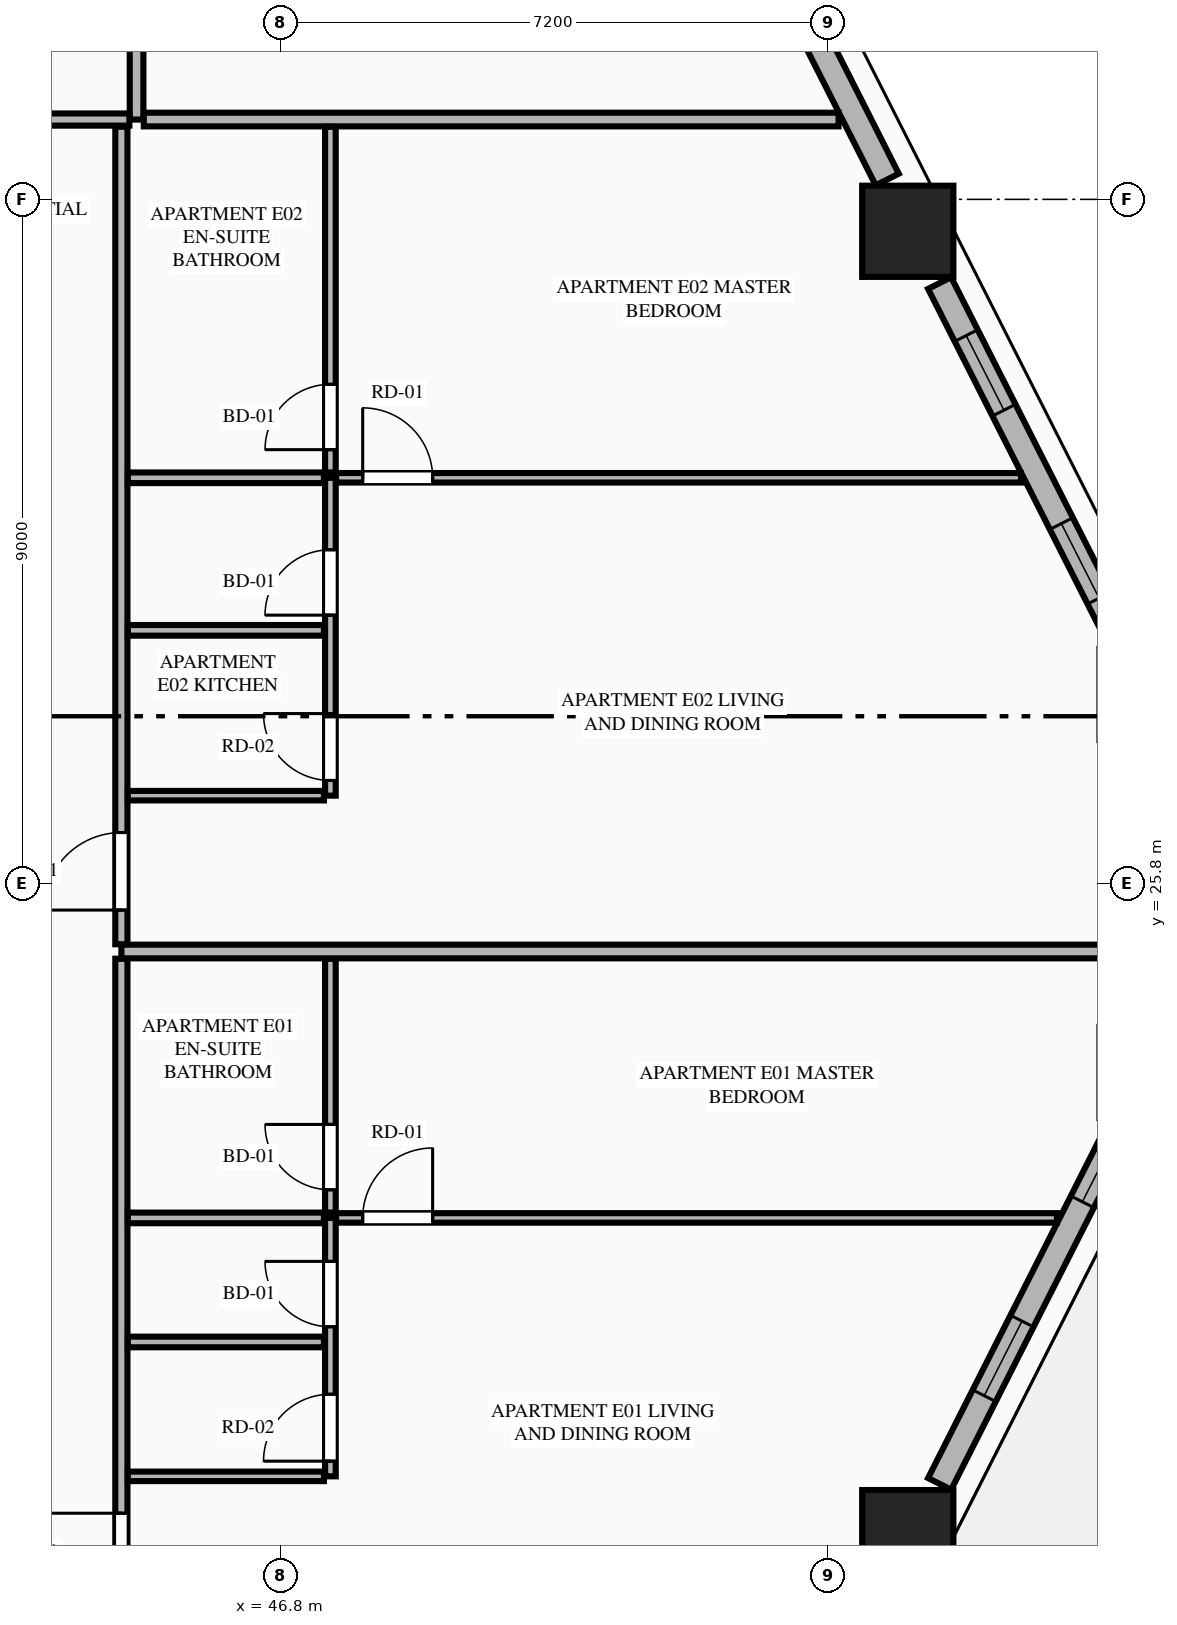
"""IFC4 building model, lengths in metres.
Left out: names, types, materials, properties, quantities, classifications, styles, units other than length and angle.
Written with IfcOpenShell. Run it as: python <this file> out.ifc"""

import sys

from ifc_helpers import new_model, si_unit, direction, frame, frame_2d, origin, origin_2d, place, context, subcontext, project, spatial, rectangle, extrude, element, fill, save


model = new_model("IFC4")
c1 = context("Model", 3, precision=1e-05, world=origin(), true_north=direction((0.0, 1.0)))
c2 = subcontext(c1, "Body", "Model", "MODEL_VIEW")
j1 = project(units=[si_unit("LENGTHUNIT", "METRE"), si_unit("PLANEANGLEUNIT", "RADIAN")], contexts=[c1])
p1 = place(None, origin())
s1 = spatial("IfcSite", under=j1, at=p1, CompositionType="ELEMENT")
p2 = place(p1, origin())
s2 = spatial("IfcBuilding", under=s1, at=p2, CompositionType="ELEMENT")
p3 = place(p2, frame((0.0, 0.0, 71.05)))
s3 = spatial("IfcBuildingStorey", under=s2, at=p3, CompositionType="ELEMENT", Elevation=71.05)
for number, where, z_axis, x_axis in (
    (1, (55.046, 17.22, 0.0), (0.0, 0.0, 1.0), (1.0, 0.0, 0.0)),
    (2, (55.046, 34.38, 0.0), (0.0, 0.0, 1.0), (1.0, 0.0, 0.0)),
):
    element("IfcColumn", number, at=place(p3, frame(where, z_axis=z_axis, x_axis=x_axis)), inside=s3, PredefinedType="COLUMN", context=c2, shape_type="SweptSolid", body=[
        extrude(rectangle(XDim=1.2, YDim=1.2, at=origin_2d()), origin(), (0.0, 0.0, 1.0), 3.55),
    ])
p4 = place(p3, frame((55.465, 17.901, 0.0), z_axis=(0.0, 0.0, 1.0), x_axis=(0.451572088722, 0.892234637686, 0.0)))
e3 = element("IfcWall", 3, at=p4, inside=s3, PredefinedType="STANDARD", context=c2, shape_type="SweptSolid", body=[
    extrude(rectangle(XDim=5.304, YDim=0.34, at=frame_2d((2.652, 0.0))), origin(), (0.0, 0.0, 1.0), 2.652),
])
p5 = place(p4, frame((1.3, 0.0, 0.75)))
e4 = element("IfcOpeningElement", 4, at=p5, cuts=e3, PredefinedType="OPENING", context=c2, shape_type="SweptSolid", body=[
    extrude(rectangle(XDim=1.1, YDim=1.752, at=frame_2d((0.55, 0.876))), frame((0.0, 0.18, 0.0), z_axis=(0.0, -1.0, 0.0), x_axis=(1.0, 0.0, 0.0)), (0.0, 0.0, 1.0), 0.36),
])
p6 = place(p4, frame((4.159, 0.0, 0.75)))
e5 = element("IfcOpeningElement", 5, at=p6, cuts=e3, PredefinedType="OPENING", context=c2, shape_type="SweptSolid", body=[
    extrude(rectangle(XDim=0.924, YDim=1.752, at=frame_2d((0.462, 0.876))), frame((0.0, 0.18, 0.0), z_axis=(0.0, -1.0, 0.0), x_axis=(1.0, 0.0, 0.0)), (0.0, 0.0, 1.0), 0.36),
])
p7 = place(p3, frame((57.86, 28.967, 0.0), z_axis=(0.0, 0.0, 1.0), x_axis=(-0.451590635984, 0.892225250422, 0.0)))
e6 = element("IfcWall", 6, at=p7, inside=s3, PredefinedType="STANDARD", context=c2, shape_type="SweptSolid", body=[
    extrude(rectangle(XDim=5.303, YDim=0.34, at=frame_2d((2.652, 0.0))), origin(), (0.0, 0.0, 1.0), 2.652),
])
p8 = place(p7, frame((0.657, 0.0, 0.75)))
e7 = element("IfcOpeningElement", 7, at=p8, cuts=e6, PredefinedType="OPENING", context=c2, shape_type="SweptSolid", body=[
    extrude(rectangle(XDim=1.1, YDim=1.752, at=frame_2d((0.55, 0.876))), frame((0.0, 0.18, 0.0), z_axis=(0.0, -1.0, 0.0), x_axis=(1.0, 0.0, 0.0)), (0.0, 0.0, 1.0), 0.36),
])
p9 = place(p7, frame((3.429, 0.0, 0.75)))
e8 = element("IfcOpeningElement", 8, at=p9, cuts=e6, PredefinedType="OPENING", context=c2, shape_type="SweptSolid", body=[
    extrude(rectangle(XDim=1.1, YDim=1.752, at=frame_2d((0.55, 0.876))), frame((0.0, 0.18, 0.0), z_axis=(0.0, -1.0, 0.0), x_axis=(1.0, 0.0, 0.0)), (0.0, 0.0, 1.0), 0.36),
])
p10 = place(p3, frame((54.776, 35.061, 0.0), z_axis=(0.0, 0.0, 1.0), x_axis=(-0.451592100298, 0.892224509273, 0.0)))
e9 = element("IfcWall", 9, at=p10, inside=s3, PredefinedType="STANDARD", context=c2, shape_type="SweptSolid", body=[
    extrude(rectangle(XDim=5.547, YDim=0.34, at=frame_2d((2.773, 0.0))), origin(), (0.0, 0.0, 1.0), 2.652),
])
p11 = place(p10, frame((2.223, 0.0, 0.75)))
e10 = element("IfcOpeningElement", 10, at=p11, cuts=e9, PredefinedType="OPENING", context=c2, shape_type="SweptSolid", body=[
    extrude(rectangle(XDim=1.1, YDim=1.752, at=frame_2d((0.55, 0.876))), frame((0.0, 0.18, 0.0), z_axis=(0.0, -1.0, 0.0), x_axis=(1.0, 0.0, 0.0)), (0.0, 0.0, 1.0), 0.36),
])
p12 = place(p3, frame((44.9, 35.85, 0.0), z_axis=(0.0, 0.0, 1.0), x_axis=(0.0, 1.0, 0.0)))
e11 = element("IfcWall", 11, at=p12, inside=s3, PredefinedType="PARTITIONING", context=c2, shape_type="SweptSolid", body=[
    extrude(rectangle(XDim=13.295, YDim=0.18, at=frame_2d((6.647, 0.0))), origin(), (0.0, 0.0, 1.0), 3.27),
])
p13 = place(p3, frame((36.617, 35.85, 0.0), z_axis=(0.0, 0.0, 1.0), x_axis=(1.0, 0.0, 0.0)))
e12 = element("IfcWall", 12, at=p13, inside=s3, PredefinedType="PARTITIONING", context=c2, shape_type="SweptSolid", body=[
    extrude(rectangle(XDim=8.188, YDim=0.16, at=frame_2d((4.094, 0.0))), origin(), (0.0, 0.0, 1.0), 3.27),
])
p14 = place(p13, frame((0.355, 0.0, 0.0)))
e13 = element("IfcOpeningElement", 13, at=p14, cuts=e12, PredefinedType="OPENING", context=c2, shape_type="SweptSolid", body=[
    extrude(rectangle(XDim=1.02, YDim=2.25, at=frame_2d((0.51, 1.125))), frame((0.0, 0.09, 0.0), z_axis=(0.0, -1.0, 0.0), x_axis=(1.0, 0.0, 0.0)), (0.0, 0.0, 1.0), 0.18),
])
p15 = place(p3, frame((44.995, 35.85, 0.0), z_axis=(0.0, 0.0, 1.0), x_axis=(1.0, 0.0, 0.0)))
e14 = element("IfcWall", 14, at=p15, inside=s3, PredefinedType="PARTITIONING", context=c2, shape_type="SweptSolid", body=[
    extrude(rectangle(XDim=9.14, YDim=0.18, at=frame_2d((4.57, 0.0))), origin(), (0.0, 0.0, 1.0), 3.27),
])
p16 = place(p3, frame((44.7, 16.045, 0.0), z_axis=(0.0, 0.0, 1.0), x_axis=(0.0, 1.0, 0.0)))
e15 = element("IfcWall", 15, at=p16, inside=s3, PredefinedType="PARTITIONING", context=c2, shape_type="SweptSolid", body=[
    extrude(rectangle(XDim=8.765, YDim=0.16, at=frame_2d((4.383, 0.0))), origin(), (0.0, 0.0, 1.0), 2.64),
])
p17 = place(p16, frame((0.45, 0.0, 0.0)))
e16 = element("IfcOpeningElement", 16, at=p17, cuts=e15, PredefinedType="OPENING", context=c2, shape_type="SweptSolid", body=[
    extrude(rectangle(XDim=1.02, YDim=2.25, at=frame_2d((0.51, 1.125))), frame((0.0, 0.09, 0.0), z_axis=(0.0, -1.0, 0.0), x_axis=(1.0, 0.0, 0.0)), (0.0, 0.0, 1.0), 0.18),
])
p18 = place(p3, frame((44.785, 18.0, 0.0), z_axis=(0.0, 0.0, 1.0), x_axis=(1.0, 0.0, 0.0)))
e17 = element("IfcWall", 17, at=p18, inside=s3, PredefinedType="PARTITIONING", context=c2, shape_type="SweptSolid", body=[
    extrude(rectangle(XDim=2.58, YDim=0.125, at=frame_2d((1.29, 0.0))), origin(), (0.0, 0.0, 1.0), 2.64),
])
p19 = place(p3, frame((47.45, 18.0, 0.0), z_axis=(0.0, 0.0, 1.0), x_axis=(0.0, 1.0, 0.0)))
e18 = element("IfcWall", 18, at=p19, inside=s3, PredefinedType="PLUMBINGWALL", context=c2, shape_type="SweptSolid", body=[
    extrude(rectangle(XDim=3.4, YDim=0.14, at=frame_2d((1.7, 0.0))), origin(), (0.0, 0.0, 1.0), 3.27),
])
p20 = place(p19, frame((0.2, 0.0, 0.0)))
e19 = element("IfcOpeningElement", 19, at=p20, cuts=e18, PredefinedType="OPENING", context=c2, shape_type="SweptSolid", body=[
    extrude(rectangle(XDim=0.88, YDim=2.15, at=frame_2d((0.44, 1.075))), frame((0.0, 0.08, 0.0), z_axis=(0.0, -1.0, 0.0), x_axis=(1.0, 0.0, 0.0)), (0.0, 0.0, 1.0), 0.16),
])
p21 = place(p19, frame((1.968, 0.0, 0.0)))
e20 = element("IfcOpeningElement", 20, at=p21, cuts=e18, PredefinedType="OPENING", context=c2, shape_type="SweptSolid", body=[
    extrude(rectangle(XDim=0.86, YDim=2.1, at=frame_2d((0.43, 1.05))), frame((0.0, 0.08, 0.0), z_axis=(0.0, -1.0, 0.0), x_axis=(1.0, 0.0, 0.0)), (0.0, 0.0, 1.0), 0.16),
])
p22 = place(p3, frame((47.45, 21.47, 0.0), z_axis=(0.0, 0.0, 1.0), x_axis=(0.0, 1.0, 0.0)))
e21 = element("IfcWall", 21, at=p22, inside=s3, PredefinedType="PLUMBINGWALL", context=c2, shape_type="SweptSolid", body=[
    extrude(rectangle(XDim=3.34, YDim=0.14, at=frame_2d((1.67, 0.0))), origin(), (0.0, 0.0, 1.0), 3.27),
])
p23 = place(p22, frame((0.3, 0.0, 0.0)))
e22 = element("IfcOpeningElement", 22, at=p23, cuts=e21, PredefinedType="OPENING", context=c2, shape_type="SweptSolid", body=[
    extrude(rectangle(XDim=0.86, YDim=2.1, at=frame_2d((0.43, 1.05))), frame((0.0, 0.08, 0.0), z_axis=(0.0, -1.0, 0.0), x_axis=(1.0, 0.0, 0.0)), (0.0, 0.0, 1.0), 0.16),
])
p24 = place(p3, frame((44.785, 21.4, 0.0), z_axis=(0.0, 0.0, 1.0), x_axis=(1.0, 0.0, 0.0)))
e23 = element("IfcWall", 23, at=p24, inside=s3, PredefinedType="PLUMBINGWALL", context=c2, shape_type="SweptSolid", body=[
    extrude(rectangle(XDim=2.58, YDim=0.14, at=frame_2d((1.29, 0.0))), origin(), (0.0, 0.0, 1.0), 3.27),
])
p25 = place(p3, frame((47.525, 21.4, 0.0), z_axis=(0.0, 0.0, 1.0), x_axis=(1.0, 0.0, 0.0)))
e24 = element("IfcWall", 24, at=p25, inside=s3, PredefinedType="PARTITIONING", context=c2, shape_type="SweptSolid", body=[
    extrude(rectangle(XDim=9.484, YDim=0.125, at=frame_2d((4.742, 0.0))), origin(), (0.0, 0.0, 1.0), 3.27),
])
p26 = place(p25, frame((0.35, 0.0, 0.0)))
e25 = element("IfcOpeningElement", 25, at=p26, cuts=e24, PredefinedType="OPENING", context=c2, shape_type="SweptSolid", body=[
    extrude(rectangle(XDim=0.92, YDim=2.15, at=frame_2d((0.46, 1.075))), frame((0.0, 0.073, 0.0), z_axis=(0.0, -1.0, 0.0), x_axis=(1.0, 0.0, 0.0)), (0.0, 0.0, 1.0), 0.145),
])
p27 = place(p3, frame((44.785, 19.768, 0.0), z_axis=(0.0, 0.0, 1.0), x_axis=(1.0, 0.0, 0.0)))
e26 = element("IfcWall", 26, at=p27, inside=s3, PredefinedType="PLUMBINGWALL", context=c2, shape_type="SweptSolid", body=[
    extrude(rectangle(XDim=2.58, YDim=0.14, at=frame_2d((1.29, 0.0))), origin(), (0.0, 0.0, 1.0), 3.27),
])
p28 = place(p3, frame((44.7, 24.905, 0.0), z_axis=(0.0, 0.0, 1.0), x_axis=(1.0, 0.0, 0.0)))
e27 = element("IfcWall", 27, at=p28, inside=s3, PredefinedType="PARTITIONING", context=c2, shape_type="SweptSolid", body=[
    extrude(rectangle(XDim=14.013, YDim=0.18, at=frame_2d((7.006, 0.0))), origin(), (0.0, 0.0, 1.0), 3.27),
])
p29 = place(p3, frame((44.7, 25.0, 0.0), z_axis=(0.0, 0.0, 1.0), x_axis=(0.0, 1.0, 0.0)))
e28 = element("IfcWall", 28, at=p29, inside=s3, PredefinedType="PARTITIONING", context=c2, shape_type="SweptSolid", body=[
    extrude(rectangle(XDim=10.755, YDim=0.16, at=frame_2d((5.377, 0.0))), origin(), (0.0, 0.0, 1.0), 2.64),
])
p30 = place(p29, frame((0.45, 0.0, 0.0)))
e29 = element("IfcOpeningElement", 29, at=p30, cuts=e28, PredefinedType="OPENING", context=c2, shape_type="SweptSolid", body=[
    extrude(rectangle(XDim=1.02, YDim=2.25, at=frame_2d((0.51, 1.125))), frame((0.0, 0.09, 0.0), z_axis=(0.0, -1.0, 0.0), x_axis=(1.0, 0.0, 0.0)), (0.0, 0.0, 1.0), 0.18),
])
p31 = place(p3, frame((44.785, 26.955, 0.0), z_axis=(0.0, 0.0, 1.0), x_axis=(1.0, 0.0, 0.0)))
e30 = element("IfcWall", 30, at=p31, inside=s3, PredefinedType="PARTITIONING", context=c2, shape_type="SweptSolid", body=[
    extrude(rectangle(XDim=2.58, YDim=0.125, at=frame_2d((1.29, 0.0))), origin(), (0.0, 0.0, 1.0), 3.27),
])
p32 = place(p3, frame((47.45, 26.955, 0.0), z_axis=(0.0, 0.0, 1.0), x_axis=(0.0, 1.0, 0.0)))
e31 = element("IfcWall", 31, at=p32, inside=s3, PredefinedType="PLUMBINGWALL", context=c2, shape_type="SweptSolid", body=[
    extrude(rectangle(XDim=4.182, YDim=0.14, at=frame_2d((2.091, 0.0))), origin(), (0.0, 0.0, 1.0), 3.27),
])
p33 = place(p32, frame((0.2, 0.0, 0.0)))
e32 = element("IfcOpeningElement", 32, at=p33, cuts=e31, PredefinedType="OPENING", context=c2, shape_type="SweptSolid", body=[
    extrude(rectangle(XDim=0.88, YDim=2.15, at=frame_2d((0.44, 1.075))), frame((0.0, 0.08, 0.0), z_axis=(0.0, -1.0, 0.0), x_axis=(1.0, 0.0, 0.0)), (0.0, 0.0, 1.0), 0.16),
])
p34 = place(p32, frame((2.375, 0.0, 0.0)))
e33 = element("IfcOpeningElement", 33, at=p34, cuts=e31, PredefinedType="OPENING", context=c2, shape_type="SweptSolid", body=[
    extrude(rectangle(XDim=0.86, YDim=2.1, at=frame_2d((0.43, 1.05))), frame((0.0, 0.08, 0.0), z_axis=(0.0, -1.0, 0.0), x_axis=(1.0, 0.0, 0.0)), (0.0, 0.0, 1.0), 0.16),
])
p35 = place(p3, frame((47.45, 31.207, 0.0), z_axis=(0.0, 0.0, 1.0), x_axis=(0.0, 1.0, 0.0)))
e34 = element("IfcWall", 34, at=p35, inside=s3, PredefinedType="PLUMBINGWALL", context=c2, shape_type="SweptSolid", body=[
    extrude(rectangle(XDim=4.548, YDim=0.14, at=frame_2d((2.274, 0.0))), origin(), (0.0, 0.0, 1.0), 3.27),
])
p36 = place(p35, frame((0.3, 0.0, 0.0)))
e35 = element("IfcOpeningElement", 35, at=p36, cuts=e34, PredefinedType="OPENING", context=c2, shape_type="SweptSolid", body=[
    extrude(rectangle(XDim=0.86, YDim=2.1, at=frame_2d((0.43, 1.05))), frame((0.0, 0.08, 0.0), z_axis=(0.0, -1.0, 0.0), x_axis=(1.0, 0.0, 0.0)), (0.0, 0.0, 1.0), 0.16),
])
p37 = place(p3, frame((44.785, 31.137, 0.0), z_axis=(0.0, 0.0, 1.0), x_axis=(1.0, 0.0, 0.0)))
e36 = element("IfcWall", 36, at=p37, inside=s3, PredefinedType="PLUMBINGWALL", context=c2, shape_type="SweptSolid", body=[
    extrude(rectangle(XDim=2.58, YDim=0.14, at=frame_2d((1.29, 0.0))), origin(), (0.0, 0.0, 1.0), 3.27),
])
p38 = place(p3, frame((47.525, 31.137, 0.0), z_axis=(0.0, 0.0, 1.0), x_axis=(1.0, 0.0, 0.0)))
e37 = element("IfcWall", 37, at=p38, inside=s3, PredefinedType="PARTITIONING", context=c2, shape_type="SweptSolid", body=[
    extrude(rectangle(XDim=9.01, YDim=0.125, at=frame_2d((4.505, 0.0))), origin(), (0.0, 0.0, 1.0), 3.27),
])
p39 = place(p38, frame((0.35, 0.0, 0.0)))
e38 = element("IfcOpeningElement", 38, at=p39, cuts=e37, PredefinedType="OPENING", context=c2, shape_type="SweptSolid", body=[
    extrude(rectangle(XDim=0.92, YDim=2.15, at=frame_2d((0.46, 1.075))), frame((0.0, 0.073, 0.0), z_axis=(0.0, -1.0, 0.0), x_axis=(1.0, 0.0, 0.0)), (0.0, 0.0, 1.0), 0.145),
])
p40 = place(p3, frame((44.785, 29.13, 0.0), z_axis=(0.0, 0.0, 1.0), x_axis=(1.0, 0.0, 0.0)))
e39 = element("IfcWall", 39, at=p40, inside=s3, PredefinedType="PLUMBINGWALL", context=c2, shape_type="SweptSolid", body=[
    extrude(rectangle(XDim=2.58, YDim=0.14, at=frame_2d((1.29, 0.0))), origin(), (0.0, 0.0, 1.0), 3.27),
])
p41 = place(p5, origin())
e40 = element("IfcWindow", 40, at=p41, inside=s3, PartitioningType="SINGLE_PANEL", PredefinedType="WINDOW", context=c2, shape_type="SweptSolid", body=[
    extrude(rectangle(XDim=1.1, YDim=1.752, at=frame_2d((0.55, 0.876))), frame((0.0, 0.03, 0.0), z_axis=(0.0, -1.0, 0.0), x_axis=(1.0, 0.0, 0.0)), (0.0, 0.0, 1.0), 0.06),
])
fill(e4, e40)
p42 = place(p8, origin())
e41 = element("IfcWindow", 41, at=p42, inside=s3, PartitioningType="SINGLE_PANEL", PredefinedType="WINDOW", context=c2, shape_type="SweptSolid", body=[
    extrude(rectangle(XDim=1.1, YDim=1.752, at=frame_2d((0.55, 0.876))), frame((0.0, 0.03, 0.0), z_axis=(0.0, -1.0, 0.0), x_axis=(1.0, 0.0, 0.0)), (0.0, 0.0, 1.0), 0.06),
])
fill(e7, e41)
p43 = place(p20, origin())
e42 = element("IfcDoor", 42, at=p43, inside=s3, OperationType="SINGLE_SWING_LEFT", PredefinedType="DOOR", context=c2, shape_type="SweptSolid", body=[
    extrude(rectangle(XDim=0.88, YDim=2.15, at=frame_2d((0.44, 1.075))), frame((0.0, 0.025, 0.0), z_axis=(0.0, -1.0, 0.0), x_axis=(1.0, 0.0, 0.0)), (0.0, 0.0, 1.0), 0.05),
])
fill(e19, e42)
p44 = place(p21, origin())
e43 = element("IfcDoor", 43, at=p44, inside=s3, OperationType="SINGLE_SWING_RIGHT", PredefinedType="DOOR", context=c2, shape_type="SweptSolid", body=[
    extrude(rectangle(XDim=0.86, YDim=2.1, at=frame_2d((0.43, 1.05))), frame((0.0, 0.025, 0.0), z_axis=(0.0, -1.0, 0.0), x_axis=(1.0, 0.0, 0.0)), (0.0, 0.0, 1.0), 0.05),
])
fill(e20, e43)
p45 = place(p23, origin())
e44 = element("IfcDoor", 44, at=p45, inside=s3, OperationType="SINGLE_SWING_RIGHT", PredefinedType="DOOR", context=c2, shape_type="SweptSolid", body=[
    extrude(rectangle(XDim=0.86, YDim=2.1, at=frame_2d((0.43, 1.05))), frame((0.0, 0.025, 0.0), z_axis=(0.0, -1.0, 0.0), x_axis=(1.0, 0.0, 0.0)), (0.0, 0.0, 1.0), 0.05),
])
fill(e22, e44)
p46 = place(p17, origin())
e45 = element("IfcDoor", 45, at=p46, inside=s3, OperationType="SINGLE_SWING_RIGHT", PredefinedType="DOOR", context=c2, shape_type="SweptSolid", body=[
    extrude(rectangle(XDim=1.02, YDim=2.25, at=frame_2d((0.51, 1.125))), frame((0.0, 0.025, 0.0), z_axis=(0.0, -1.0, 0.0), x_axis=(1.0, 0.0, 0.0)), (0.0, 0.0, 1.0), 0.05),
])
fill(e16, e45)
p47 = place(p26, origin())
e46 = element("IfcDoor", 46, at=p47, inside=s3, OperationType="SINGLE_SWING_RIGHT", PredefinedType="DOOR", context=c2, shape_type="SweptSolid", body=[
    extrude(rectangle(XDim=0.92, YDim=2.15, at=frame_2d((0.46, 1.075))), frame((0.0, 0.025, 0.0), z_axis=(0.0, -1.0, 0.0), x_axis=(1.0, 0.0, 0.0)), (0.0, 0.0, 1.0), 0.05),
])
fill(e25, e46)
p48 = place(p33, origin())
e47 = element("IfcDoor", 47, at=p48, inside=s3, OperationType="SINGLE_SWING_RIGHT", PredefinedType="DOOR", context=c2, shape_type="SweptSolid", body=[
    extrude(rectangle(XDim=0.88, YDim=2.15, at=frame_2d((0.44, 1.075))), frame((0.0, 0.025, 0.0), z_axis=(0.0, -1.0, 0.0), x_axis=(1.0, 0.0, 0.0)), (0.0, 0.0, 1.0), 0.05),
])
fill(e32, e47)
p49 = place(p34, origin())
e48 = element("IfcDoor", 48, at=p49, inside=s3, OperationType="SINGLE_SWING_LEFT", PredefinedType="DOOR", context=c2, shape_type="SweptSolid", body=[
    extrude(rectangle(XDim=0.86, YDim=2.1, at=frame_2d((0.43, 1.05))), frame((0.0, 0.025, 0.0), z_axis=(0.0, -1.0, 0.0), x_axis=(1.0, 0.0, 0.0)), (0.0, 0.0, 1.0), 0.05),
])
fill(e33, e48)
p50 = place(p36, origin())
e49 = element("IfcDoor", 49, at=p50, inside=s3, OperationType="SINGLE_SWING_LEFT", PredefinedType="DOOR", context=c2, shape_type="SweptSolid", body=[
    extrude(rectangle(XDim=0.86, YDim=2.1, at=frame_2d((0.43, 1.05))), frame((0.0, 0.025, 0.0), z_axis=(0.0, -1.0, 0.0), x_axis=(1.0, 0.0, 0.0)), (0.0, 0.0, 1.0), 0.05),
])
fill(e35, e49)
p51 = place(p30, origin())
e50 = element("IfcDoor", 50, at=p51, inside=s3, OperationType="SINGLE_SWING_LEFT", PredefinedType="DOOR", context=c2, shape_type="SweptSolid", body=[
    extrude(rectangle(XDim=1.02, YDim=2.25, at=frame_2d((0.51, 1.125))), frame((0.0, 0.025, 0.0), z_axis=(0.0, -1.0, 0.0), x_axis=(1.0, 0.0, 0.0)), (0.0, 0.0, 1.0), 0.05),
])
fill(e29, e50)
p52 = place(p39, origin())
e51 = element("IfcDoor", 51, at=p52, inside=s3, OperationType="SINGLE_SWING_LEFT", PredefinedType="DOOR", context=c2, shape_type="SweptSolid", body=[
    extrude(rectangle(XDim=0.92, YDim=2.15, at=frame_2d((0.46, 1.075))), frame((0.0, 0.025, 0.0), z_axis=(0.0, -1.0, 0.0), x_axis=(1.0, 0.0, 0.0)), (0.0, 0.0, 1.0), 0.05),
])
fill(e38, e51)
p53 = place(p6, origin())
e52 = element("IfcWindow", 52, at=p53, inside=s3, PartitioningType="SINGLE_PANEL", PredefinedType="WINDOW", context=c2, shape_type="SweptSolid", body=[
    extrude(rectangle(XDim=0.924, YDim=1.752, at=frame_2d((0.462, 0.876))), frame((0.0, 0.03, 0.0), z_axis=(0.0, -1.0, 0.0), x_axis=(1.0, 0.0, 0.0)), (0.0, 0.0, 1.0), 0.06),
])
fill(e5, e52)
p54 = place(p9, origin())
e53 = element("IfcWindow", 53, at=p54, inside=s3, PartitioningType="SINGLE_PANEL", PredefinedType="WINDOW", context=c2, shape_type="SweptSolid", body=[
    extrude(rectangle(XDim=1.1, YDim=1.752, at=frame_2d((0.55, 0.876))), frame((0.0, 0.03, 0.0), z_axis=(0.0, -1.0, 0.0), x_axis=(1.0, 0.0, 0.0)), (0.0, 0.0, 1.0), 0.06),
])
fill(e8, e53)
save(model, sys.argv[1])
